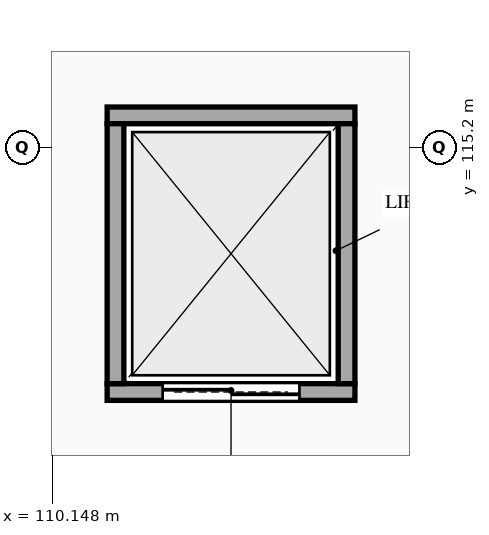
"""IFC4 building model, lengths in metres.
Left out: names, types, materials, properties, quantities, classifications, styles, units other than length and angle.
Written with IfcOpenShell. Run it as: python <this file> out.ifc"""

import sys

from ifc_helpers import new_model, si_unit, direction, frame, frame_2d, origin, place, context, subcontext, project, spatial, rectangle, extrude, element, fill, save


model = new_model("IFC4")
c1 = context("Model", 3, precision=1e-05, world=origin(), true_north=direction((0.0, 1.0)))
c2 = subcontext(c1, "Body", "Model", "MODEL_VIEW")
j1 = project(units=[si_unit("LENGTHUNIT", "METRE"), si_unit("PLANEANGLEUNIT", "RADIAN")], contexts=[c1])
p1 = place(None, origin())
s1 = spatial("IfcSite", under=j1, at=p1, CompositionType="ELEMENT")
p2 = place(p1, origin())
s2 = spatial("IfcBuilding", under=s1, at=p2, CompositionType="ELEMENT")
p3 = place(p2, frame((0.0, 0.0, 19.8)))
s3 = spatial("IfcBuildingStorey", under=s2, at=p3, CompositionType="ELEMENT", Elevation=19.8)
p4 = place(p3, frame((110.87, 111.98, 0.0), z_axis=(0.0, 0.0, 1.0), x_axis=(1.0, 0.0, 0.0)))
e1 = element("IfcWall", 1, at=p4, inside=s3, PredefinedType="STANDARD", context=c2, shape_type="SweptSolid", body=[
    extrude(rectangle(XDim=3.26, YDim=0.22, at=frame_2d((1.63, 0.0))), origin(), (0.0, 0.0, 1.0), 4.25),
])
p5 = place(p4, frame((0.73, 0.0, 0.0)))
e2 = element("IfcOpeningElement", 2, at=p5, cuts=e1, PredefinedType="OPENING", context=c2, shape_type="SweptSolid", body=[
    extrude(rectangle(XDim=1.8, YDim=2.35, at=frame_2d((0.9, 1.175))), frame((0.0, 0.12, 0.0), z_axis=(0.0, -1.0, 0.0), x_axis=(1.0, 0.0, 0.0)), (0.0, 0.0, 1.0), 0.24),
])
p6 = place(p3, frame((114.13, 115.62, 0.0), z_axis=(0.0, 0.0, 1.0), x_axis=(-1.0, 0.0, 0.0)))
e3 = element("IfcWall", 3, at=p6, inside=s3, PredefinedType="STANDARD", context=c2, shape_type="SweptSolid", body=[
    extrude(rectangle(XDim=3.26, YDim=0.22, at=frame_2d((1.63, 0.0))), origin(), (0.0, 0.0, 1.0), 4.25),
])
for number, where, z_axis, x_axis in (
    (4, (110.98, 115.51, 0.0), (0.0, 0.0, 1.0), (0.0, -1.0, 0.0)),
    (5, (114.02, 112.09, 0.0), (0.0, 0.0, 1.0), (0.0, 1.0, 0.0)),
):
    element("IfcWall", number, at=place(p3, frame(where, z_axis=z_axis, x_axis=x_axis)), inside=s3, PredefinedType="STANDARD", context=c2, shape_type="SweptSolid", body=[
        extrude(rectangle(XDim=3.42, YDim=0.22, at=frame_2d((1.71, 0.0))), origin(), (0.0, 0.0, 1.0), 4.25),
    ])
p7 = place(p5, origin())
e6 = element("IfcDoor", 6, at=p7, inside=s3, OperationType="DOUBLE_DOOR_SLIDING", PredefinedType="DOOR", context=c2, shape_type="SweptSolid", body=[
    extrude(rectangle(XDim=1.8, YDim=2.35, at=frame_2d((0.9, 1.175))), frame((0.0, 0.025, 0.0), z_axis=(0.0, -1.0, 0.0), x_axis=(1.0, 0.0, 0.0)), (0.0, 0.0, 1.0), 0.05),
])
fill(e2, e6)
save(model, sys.argv[1])
